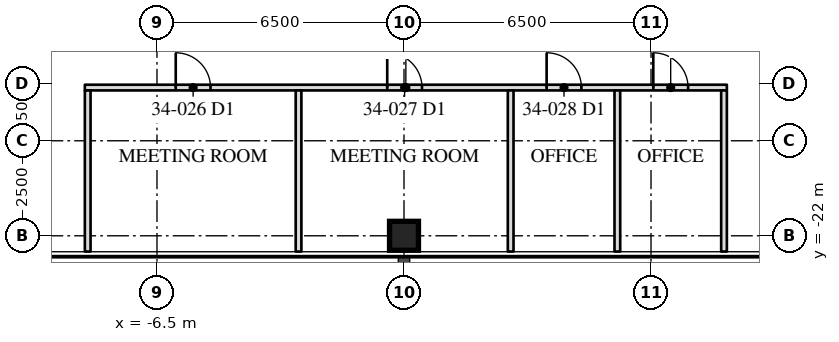
"""IFC4 building model, lengths in metres.
Left out: names, types, materials, properties, quantities, classifications, styles, units other than length and angle.
Written with IfcOpenShell. Run it as: python <this file> out.ifc"""

import sys

from ifc_helpers import new_model, si_unit, direction, frame, frame_2d, origin, origin_2d, place, context, subcontext, project, spatial, rectangle, hollow_rectangle, extrude, element, fill, save


model = new_model("IFC4")
c1 = context("Model", 3, precision=1e-05, world=origin(), true_north=direction((0.0, 1.0)))
c2 = subcontext(c1, "Body", "Model", "MODEL_VIEW")
j1 = project(units=[si_unit("LENGTHUNIT", "METRE"), si_unit("PLANEANGLEUNIT", "RADIAN")], contexts=[c1])
p1 = place(None, origin())
s1 = spatial("IfcSite", under=j1, at=p1, CompositionType="ELEMENT")
p2 = place(p1, origin())
s2 = spatial("IfcBuilding", under=s1, at=p2, CompositionType="ELEMENT")
p3 = place(p2, frame((0.0, 0.0, 145.9)))
s3 = spatial("IfcBuildingStorey", under=s2, at=p3, CompositionType="ELEMENT", Elevation=145.9)
p4 = place(p3, frame((0.0, -22.0, 0.0), z_axis=(0.0, 0.0, 1.0), x_axis=(1.0, 0.0, 0.0)))
e1 = element("IfcColumn", 1, at=p4, inside=s3, PredefinedType="COLUMN", context=c2, shape_type="SweptSolid", body=[
    extrude(hollow_rectangle(XDim=0.762, YDim=0.762, WallThickness=0.076, at=origin_2d()), origin(), (0.0, 0.0, 1.0), 4.1),
])
p5 = place(p3, frame((-8.398, -18.1, 0.0), z_axis=(0.0, 0.0, 1.0), x_axis=(1.0, 0.0, 0.0)))
e2 = element("IfcWall", 2, at=p5, inside=s3, PredefinedType="PARTITIONING", context=c2, shape_type="SweptSolid", body=[
    extrude(rectangle(XDim=16.894, YDim=0.15, at=frame_2d((8.447, 0.0))), origin(), (0.0, 0.0, 1.0), 3.91),
])
p6 = place(p5, frame((2.392, 0.0, 0.0)))
e3 = element("IfcOpeningElement", 3, at=p6, cuts=e2, PredefinedType="OPENING", context=c2, shape_type="SweptSolid", body=[
    extrude(rectangle(XDim=0.915, YDim=2.134, at=frame_2d((0.458, 1.067))), frame((0.0, 0.085, 0.0), z_axis=(0.0, -1.0, 0.0), x_axis=(1.0, 0.0, 0.0)), (0.0, 0.0, 1.0), 0.17),
])
p7 = place(p5, frame((7.957, 0.0, 0.0)))
e4 = element("IfcOpeningElement", 4, at=p7, cuts=e2, PredefinedType="OPENING", context=c2, shape_type="SweptSolid", body=[
    extrude(rectangle(XDim=0.915, YDim=2.134, at=frame_2d((0.458, 1.067))), frame((0.0, 0.085, 0.0), z_axis=(0.0, -1.0, 0.0), x_axis=(1.0, 0.0, 0.0)), (0.0, 0.0, 1.0), 0.17),
])
p8 = place(p5, frame((12.151, 0.0, 0.0)))
e5 = element("IfcOpeningElement", 5, at=p8, cuts=e2, PredefinedType="OPENING", context=c2, shape_type="SweptSolid", body=[
    extrude(rectangle(XDim=0.915, YDim=2.134, at=frame_2d((0.458, 1.067))), frame((0.0, 0.085, 0.0), z_axis=(0.0, -1.0, 0.0), x_axis=(1.0, 0.0, 0.0)), (0.0, 0.0, 1.0), 0.17),
])
p9 = place(p5, frame((14.958, 0.0, 0.0)))
e6 = element("IfcOpeningElement", 6, at=p9, cuts=e2, PredefinedType="OPENING", context=c2, shape_type="SweptSolid", body=[
    extrude(rectangle(XDim=0.915, YDim=2.134, at=frame_2d((0.458, 1.067))), frame((0.0, 0.085, 0.0), z_axis=(0.0, -1.0, 0.0), x_axis=(1.0, 0.0, 0.0)), (0.0, 0.0, 1.0), 0.17),
])
for number, where, z_axis, x_axis in (
    (7, (-8.323, -18.175, 0.0), (0.0, 0.0, 1.0), (0.0, -1.0, 0.0)),
    (8, (-2.775, -18.175, 0.0), (0.0, 0.0, 1.0), (0.0, -1.0, 0.0)),
    (9, (2.807, -18.175, 0.0), (0.0, 0.0, 1.0), (0.0, -1.0, 0.0)),
    (10, (5.614, -18.175, 0.0), (0.0, 0.0, 1.0), (0.0, -1.0, 0.0)),
    (11, (8.421, -18.175, 0.0), (0.0, 0.0, 1.0), (0.0, -1.0, 0.0)),
):
    element("IfcWall", number, at=place(p3, frame(where, z_axis=z_axis, x_axis=x_axis)), inside=s3, PredefinedType="PARTITIONING", context=c2, shape_type="SweptSolid", body=[
        extrude(rectangle(XDim=4.24, YDim=0.15, at=frame_2d((2.12, 0.0))), origin(), (0.0, 0.0, 1.0), 3.91),
    ])
p10 = place(p6, origin())
e12 = element("IfcDoor", 12, at=p10, inside=s3, OperationType="SINGLE_SWING_LEFT", PredefinedType="DOOR", context=c2, shape_type="SweptSolid", body=[
    extrude(rectangle(XDim=0.915, YDim=2.134, at=frame_2d((0.458, 1.067))), frame((0.0, 0.025, 0.0), z_axis=(0.0, -1.0, 0.0), x_axis=(1.0, 0.0, 0.0)), (0.0, 0.0, 1.0), 0.05),
])
fill(e3, e12)
p11 = place(p7, origin())
e13 = element("IfcDoor", 13, at=p11, inside=s3, OperationType="SINGLE_SWING_LEFT", PredefinedType="DOOR", context=c2, shape_type="SweptSolid", body=[
    extrude(rectangle(XDim=0.915, YDim=2.134, at=frame_2d((0.458, 1.067))), frame((0.0, 0.025, 0.0), z_axis=(0.0, -1.0, 0.0), x_axis=(1.0, 0.0, 0.0)), (0.0, 0.0, 1.0), 0.05),
])
fill(e4, e13)
p12 = place(p8, origin())
e14 = element("IfcDoor", 14, at=p12, inside=s3, OperationType="SINGLE_SWING_LEFT", PredefinedType="DOOR", context=c2, shape_type="SweptSolid", body=[
    extrude(rectangle(XDim=0.915, YDim=2.134, at=frame_2d((0.458, 1.067))), frame((0.0, 0.025, 0.0), z_axis=(0.0, -1.0, 0.0), x_axis=(1.0, 0.0, 0.0)), (0.0, 0.0, 1.0), 0.05),
])
fill(e5, e14)
p13 = place(p9, origin())
e15 = element("IfcDoor", 15, at=p13, inside=s3, OperationType="SINGLE_SWING_LEFT", PredefinedType="DOOR", context=c2, shape_type="SweptSolid", body=[
    extrude(rectangle(XDim=0.915, YDim=2.134, at=frame_2d((0.458, 1.067))), frame((0.0, 0.025, 0.0), z_axis=(0.0, -1.0, 0.0), x_axis=(1.0, 0.0, 0.0)), (0.0, 0.0, 1.0), 0.05),
])
fill(e6, e15)
save(model, sys.argv[1])
